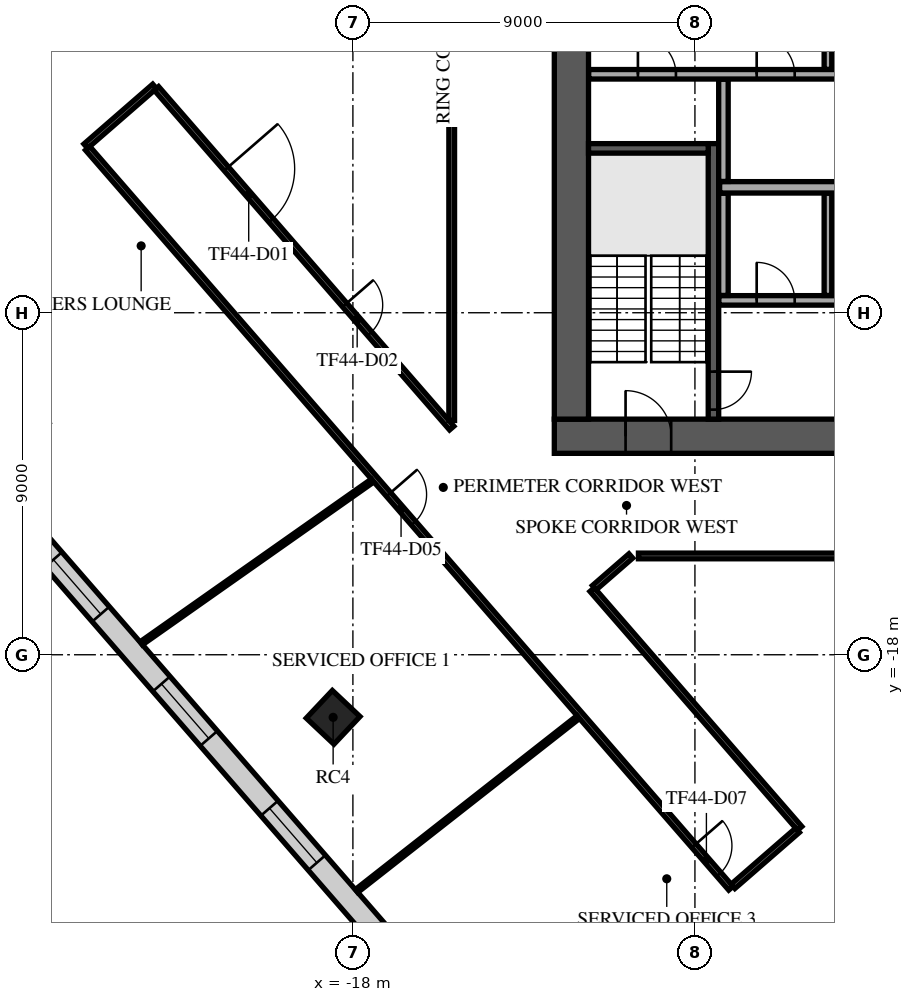
"""IFC4 building model, lengths in metres.
Left out: names, types, materials, properties, quantities, classifications, styles, units other than length and angle.
Written with IfcOpenShell. Run it as: python <this file> out.ifc"""

import sys

from ifc_helpers import new_model, si_unit, direction, frame, frame_2d, origin, origin_2d, place, context, subcontext, project, spatial, rectangle, extrude, element, fill, save


model = new_model("IFC4")
c1 = context("Model", 3, precision=1e-05, world=origin(), true_north=direction((0.0, 1.0)))
c2 = subcontext(c1, "Body", "Model", "MODEL_VIEW")
j1 = project(units=[si_unit("LENGTHUNIT", "METRE"), si_unit("PLANEANGLEUNIT", "RADIAN")], contexts=[c1])
p1 = place(None, origin())
s1 = spatial("IfcSite", under=j1, at=p1, CompositionType="ELEMENT")
p2 = place(p1, origin())
s2 = spatial("IfcBuilding", under=s1, at=p2, CompositionType="ELEMENT")
p3 = place(p2, frame((0.0, 0.0, 193.3)))
s3 = spatial("IfcBuildingStorey", under=s2, at=p3, CompositionType="ELEMENT", Elevation=193.3)
p4 = place(p3, frame((-18.52, -19.647, 0.0), z_axis=(0.0, 0.0, 1.0), x_axis=(0.685916152371, 0.727680583715, 0.0)))
e1 = element("IfcColumn", 1, at=p4, inside=s3, PredefinedType="COLUMN", context=c2, shape_type="SweptSolid", body=[
    extrude(rectangle(XDim=1.0, YDim=1.0, at=origin_2d()), origin(), (0.0, 0.0, 1.0), 4.0),
])
p5 = place(p3, frame((-12.7, -12.25, 0.0), z_axis=(0.0, 0.0, 1.0), x_axis=(1.0, 0.0, 0.0)))
e2 = element("IfcWall", 2, at=p5, inside=s3, PredefinedType="SHEAR", context=c2, shape_type="SweptSolid", body=[
    extrude(rectangle(XDim=25.4, YDim=0.9, at=frame_2d((12.7, 0.0))), origin(), (0.0, 0.0, 1.0), 3.62),
])
p6 = place(p5, frame((7.6, 0.0, 0.0)))
e3 = element("IfcOpeningElement", 3, at=p6, cuts=e2, PredefinedType="OPENING", context=c2, shape_type="SweptSolid", body=[
    extrude(rectangle(XDim=2.0, YDim=2.1, at=frame_2d((1.0, 1.05))), frame((0.0, 0.46, 0.0), z_axis=(0.0, -1.0, 0.0), x_axis=(1.0, 0.0, 0.0)), (0.0, 0.0, 1.0), 0.92),
])
p7 = place(p5, frame((17.725, 0.0, 0.0)))
e4 = element("IfcOpeningElement", 4, at=p7, cuts=e2, PredefinedType="OPENING", context=c2, shape_type="SweptSolid", body=[
    extrude(rectangle(XDim=1.2, YDim=2.1, at=frame_2d((0.6, 1.05))), frame((0.0, 0.46, 0.0), z_axis=(0.0, -1.0, 0.0), x_axis=(1.0, 0.0, 0.0)), (0.0, 0.0, 1.0), 0.92),
])
p8 = place(p5, frame((1.875, 0.0, 0.0)))
e5 = element("IfcOpeningElement", 5, at=p8, cuts=e2, PredefinedType="OPENING", context=c2, shape_type="SweptSolid", body=[
    extrude(rectangle(XDim=1.2, YDim=2.1, at=frame_2d((0.6, 1.05))), frame((0.0, 0.46, 0.0), z_axis=(0.0, -1.0, 0.0), x_axis=(1.0, 0.0, 0.0)), (0.0, 0.0, 1.0), 0.92),
])
p9 = place(p5, frame((22.325, 0.0, 0.0)))
e6 = element("IfcOpeningElement", 6, at=p9, cuts=e2, PredefinedType="OPENING", context=c2, shape_type="SweptSolid", body=[
    extrude(rectangle(XDim=1.2, YDim=2.1, at=frame_2d((0.6, 1.05))), frame((0.0, 0.46, 0.0), z_axis=(0.0, -1.0, 0.0), x_axis=(1.0, 0.0, 0.0)), (0.0, 0.0, 1.0), 0.92),
])
p10 = place(p3, frame((-12.25, -11.8, 0.0), z_axis=(0.0, 0.0, 1.0), x_axis=(0.0, 1.0, 0.0)))
e7 = element("IfcWall", 7, at=p10, inside=s3, PredefinedType="SHEAR", context=c2, shape_type="SweptSolid", body=[
    extrude(rectangle(XDim=23.6, YDim=0.9, at=frame_2d((11.8, 0.0))), origin(), (0.0, 0.0, 1.0), 3.62),
])
p11 = place(p10, frame((10.6, 0.0, 0.0)))
e8 = element("IfcOpeningElement", 8, at=p11, cuts=e7, PredefinedType="OPENING", context=c2, shape_type="SweptSolid", body=[
    extrude(rectangle(XDim=2.4, YDim=2.4, at=frame_2d((1.2, 1.2))), frame((0.0, 0.46, 0.0), z_axis=(0.0, -1.0, 0.0), x_axis=(1.0, 0.0, 0.0)), (0.0, 0.0, 1.0), 0.92),
])
p12 = place(p3, frame((-8.512, -4.55, 0.0), z_axis=(0.0, 0.0, 1.0), x_axis=(0.0, -1.0, 0.0)))
e9 = element("IfcWall", 9, at=p12, inside=s3, PredefinedType="SOLIDWALL", context=c2, shape_type="SweptSolid", body=[
    extrude(rectangle(XDim=7.25, YDim=0.275, at=frame_2d((3.625, 0.0))), origin(), (0.0, 0.0, 1.0), 3.62),
])
p13 = place(p12, frame((6.0, 0.0, 0.0)))
e10 = element("IfcOpeningElement", 10, at=p13, cuts=e9, PredefinedType="OPENING", context=c2, shape_type="SweptSolid", body=[
    extrude(rectangle(XDim=1.0, YDim=2.1, at=frame_2d((0.5, 1.05))), frame((0.0, 0.147, 0.0), z_axis=(0.0, -1.0, 0.0), x_axis=(1.0, 0.0, 0.0)), (0.0, 0.0, 1.0), 0.295),
])
p14 = place(p3, frame((-8.65, -4.675, 0.0), z_axis=(0.0, 0.0, 1.0), x_axis=(-1.0, 0.0, 0.0)))
e11 = element("IfcWall", 11, at=p14, inside=s3, PredefinedType="SOLIDWALL", context=c2, shape_type="SweptSolid", body=[
    extrude(rectangle(XDim=3.15, YDim=0.25, at=frame_2d((1.575, 0.0))), origin(), (0.0, 0.0, 1.0), 3.62),
])
p15 = place(p3, frame((-8.37, -8.675, 0.0), z_axis=(0.0, 0.0, 1.0), x_axis=(1.0, 0.0, 0.0)))
e12 = element("IfcWall", 12, at=p15, inside=s3, PredefinedType="PARTITIONING", context=c2, shape_type="SweptSolid", body=[
    extrude(rectangle(XDim=5.49, YDim=0.25, at=frame_2d((2.745, 0.0))), origin(), (0.0, 0.0, 1.0), 3.62),
])
p16 = place(p15, frame((0.995, 0.0, 0.0)))
e13 = element("IfcOpeningElement", 13, at=p16, cuts=e12, PredefinedType="OPENING", context=c2, shape_type="SweptSolid", body=[
    extrude(rectangle(XDim=1.0, YDim=2.1, at=frame_2d((0.5, 1.05))), frame((0.0, 0.135, 0.0), z_axis=(0.0, -1.0, 0.0), x_axis=(1.0, 0.0, 0.0)), (0.0, 0.0, 1.0), 0.27),
])
p17 = place(p15, frame((3.745, 0.0, 0.0)))
e14 = element("IfcOpeningElement", 14, at=p17, cuts=e12, PredefinedType="OPENING", context=c2, shape_type="SweptSolid", body=[
    extrude(rectangle(XDim=1.0, YDim=2.1, at=frame_2d((0.5, 1.05))), frame((0.0, 0.135, 0.0), z_axis=(0.0, -1.0, 0.0), x_axis=(1.0, 0.0, 0.0)), (0.0, 0.0, 1.0), 0.27),
])
p18 = place(p3, frame((-8.25, -8.545, 0.0), z_axis=(0.0, 0.0, 1.0), x_axis=(0.0, 1.0, 0.0)))
e15 = element("IfcWall", 15, at=p18, inside=s3, PredefinedType="PARTITIONING", context=c2, shape_type="SweptSolid", body=[
    extrude(rectangle(XDim=2.69, YDim=0.25, at=frame_2d((1.345, 0.0))), origin(), (0.0, 0.0, 1.0), 3.62),
])
p19 = place(p3, frame((-5.5, -8.545, 0.0), z_axis=(0.0, 0.0, 1.0), x_axis=(0.0, 1.0, 0.0)))
e16 = element("IfcWall", 16, at=p19, inside=s3, PredefinedType="PARTITIONING", context=c2, shape_type="SweptSolid", body=[
    extrude(rectangle(XDim=2.69, YDim=0.2, at=frame_2d((1.345, 0.0))), origin(), (0.0, 0.0, 1.0), 3.62),
])
p20 = place(p3, frame((-8.35, -5.7, 0.0), z_axis=(0.0, 0.0, 1.0), x_axis=(1.0, 0.0, 0.0)))
e17 = element("IfcWall", 17, at=p20, inside=s3, PredefinedType="PARTITIONING", context=c2, shape_type="SweptSolid", body=[
    extrude(rectangle(XDim=5.47, YDim=0.3, at=frame_2d((2.735, 0.0))), origin(), (0.0, 0.0, 1.0), 3.62),
])
p21 = place(p3, frame((-8.25, -5.545, 0.0), z_axis=(0.0, 0.0, 1.0), x_axis=(0.0, 1.0, 0.0)))
e18 = element("IfcWall", 18, at=p21, inside=s3, PredefinedType="PARTITIONING", context=c2, shape_type="SweptSolid", body=[
    extrude(rectangle(XDim=2.69, YDim=0.25, at=frame_2d((1.345, 0.0))), origin(), (0.0, 0.0, 1.0), 3.62),
])
p22 = place(p3, frame((-11.795, -2.725, 0.0), z_axis=(0.0, 0.0, 1.0), x_axis=(1.0, 0.0, 0.0)))
e19 = element("IfcWall", 19, at=p22, inside=s3, PredefinedType="PARTITIONING", context=c2, shape_type="SweptSolid", body=[
    extrude(rectangle(XDim=8.915, YDim=0.25, at=frame_2d((4.458, 0.0))), origin(), (0.0, 0.0, 1.0), 3.62),
])
p23 = place(p22, frame((1.295, 0.0, 0.0)))
e20 = element("IfcOpeningElement", 20, at=p23, cuts=e19, PredefinedType="OPENING", context=c2, shape_type="SweptSolid", body=[
    extrude(rectangle(XDim=1.0, YDim=2.1, at=frame_2d((0.5, 1.05))), frame((0.0, 0.135, 0.0), z_axis=(0.0, -1.0, 0.0), x_axis=(1.0, 0.0, 0.0)), (0.0, 0.0, 1.0), 0.27),
])
p24 = place(p22, frame((4.42, 0.0, 0.0)))
e21 = element("IfcOpeningElement", 21, at=p24, cuts=e19, PredefinedType="OPENING", context=c2, shape_type="SweptSolid", body=[
    extrude(rectangle(XDim=1.0, YDim=2.1, at=frame_2d((0.5, 1.05))), frame((0.0, 0.135, 0.0), z_axis=(0.0, -1.0, 0.0), x_axis=(1.0, 0.0, 0.0)), (0.0, 0.0, 1.0), 0.27),
])
p25 = place(p3, frame((-5.5, -2.595, 0.0), z_axis=(0.0, 0.0, 1.0), x_axis=(0.0, 1.0, 0.0)))
e22 = element("IfcWall", 22, at=p25, inside=s3, PredefinedType="PARTITIONING", context=c2, shape_type="SweptSolid", body=[
    extrude(rectangle(XDim=5.19, YDim=0.2, at=frame_2d((2.595, 0.0))), origin(), (0.0, 0.0, 1.0), 3.62),
])
p26 = place(p25, frame((1.395, 0.0, 0.0)))
e23 = element("IfcOpeningElement", 23, at=p26, cuts=e22, PredefinedType="OPENING", context=c2, shape_type="SweptSolid", body=[
    extrude(rectangle(XDim=2.4, YDim=2.4, at=frame_2d((1.2, 1.2))), frame((0.0, 0.11, 0.0), z_axis=(0.0, -1.0, 0.0), x_axis=(1.0, 0.0, 0.0)), (0.0, 0.0, 1.0), 0.22),
])
p27 = place(p3, frame((-35.208, -4.768, 0.0), z_axis=(0.0, 0.0, 1.0), x_axis=(0.656058749455, -0.754709823219, 0.0)))
e24 = element("IfcWall", 24, at=p27, inside=s3, PredefinedType="STANDARD", context=c2, shape_type="SweptSolid", body=[
    extrude(rectangle(XDim=39.0, YDim=0.6, at=frame_2d((19.5, 0.0))), origin(), (0.0, 0.0, 1.0), 3.62),
])
p28 = place(p27, frame((1.217, 0.0, 0.9)))
e25 = element("IfcOpeningElement", 25, at=p28, cuts=e24, PredefinedType="OPENING", context=c2, shape_type="SweptSolid", body=[
    extrude(rectangle(XDim=1.9, YDim=2.1, at=frame_2d((0.95, 1.05))), frame((0.0, 0.31, 0.0), z_axis=(0.0, -1.0, 0.0), x_axis=(1.0, 0.0, 0.0)), (0.0, 0.0, 1.0), 0.62),
])
p29 = place(p27, frame((5.55, 0.0, 0.9)))
e26 = element("IfcOpeningElement", 26, at=p29, cuts=e24, PredefinedType="OPENING", context=c2, shape_type="SweptSolid", body=[
    extrude(rectangle(XDim=1.9, YDim=2.1, at=frame_2d((0.95, 1.05))), frame((0.0, 0.31, 0.0), z_axis=(0.0, -1.0, 0.0), x_axis=(1.0, 0.0, 0.0)), (0.0, 0.0, 1.0), 0.62),
])
p30 = place(p27, frame((9.883, 0.0, 0.9)))
e27 = element("IfcOpeningElement", 27, at=p30, cuts=e24, PredefinedType="OPENING", context=c2, shape_type="SweptSolid", body=[
    extrude(rectangle(XDim=1.9, YDim=2.1, at=frame_2d((0.95, 1.05))), frame((0.0, 0.31, 0.0), z_axis=(0.0, -1.0, 0.0), x_axis=(1.0, 0.0, 0.0)), (0.0, 0.0, 1.0), 0.62),
])
p31 = place(p27, frame((14.217, 0.0, 0.9)))
e28 = element("IfcOpeningElement", 28, at=p31, cuts=e24, PredefinedType="OPENING", context=c2, shape_type="SweptSolid", body=[
    extrude(rectangle(XDim=1.9, YDim=2.1, at=frame_2d((0.95, 1.05))), frame((0.0, 0.31, 0.0), z_axis=(0.0, -1.0, 0.0), x_axis=(1.0, 0.0, 0.0)), (0.0, 0.0, 1.0), 0.62),
])
p32 = place(p27, frame((18.55, 0.0, 0.9)))
e29 = element("IfcOpeningElement", 29, at=p32, cuts=e24, PredefinedType="OPENING", context=c2, shape_type="SweptSolid", body=[
    extrude(rectangle(XDim=1.9, YDim=2.1, at=frame_2d((0.95, 1.05))), frame((0.0, 0.31, 0.0), z_axis=(0.0, -1.0, 0.0), x_axis=(1.0, 0.0, 0.0)), (0.0, 0.0, 1.0), 0.62),
])
p33 = place(p27, frame((22.883, 0.0, 0.9)))
e30 = element("IfcOpeningElement", 30, at=p33, cuts=e24, PredefinedType="OPENING", context=c2, shape_type="SweptSolid", body=[
    extrude(rectangle(XDim=1.9, YDim=2.1, at=frame_2d((0.95, 1.05))), frame((0.0, 0.31, 0.0), z_axis=(0.0, -1.0, 0.0), x_axis=(1.0, 0.0, 0.0)), (0.0, 0.0, 1.0), 0.62),
])
p34 = place(p27, frame((27.217, 0.0, 0.9)))
e31 = element("IfcOpeningElement", 31, at=p34, cuts=e24, PredefinedType="OPENING", context=c2, shape_type="SweptSolid", body=[
    extrude(rectangle(XDim=1.9, YDim=2.1, at=frame_2d((0.95, 1.05))), frame((0.0, 0.31, 0.0), z_axis=(0.0, -1.0, 0.0), x_axis=(1.0, 0.0, 0.0)), (0.0, 0.0, 1.0), 0.62),
])
p35 = place(p27, frame((31.55, 0.0, 0.9)))
e32 = element("IfcOpeningElement", 32, at=p35, cuts=e24, PredefinedType="OPENING", context=c2, shape_type="SweptSolid", body=[
    extrude(rectangle(XDim=1.9, YDim=2.1, at=frame_2d((0.95, 1.05))), frame((0.0, 0.31, 0.0), z_axis=(0.0, -1.0, 0.0), x_axis=(1.0, 0.0, 0.0)), (0.0, 0.0, 1.0), 0.62),
])
p36 = place(p27, frame((35.883, 0.0, 0.9)))
e33 = element("IfcOpeningElement", 33, at=p36, cuts=e24, PredefinedType="OPENING", context=c2, shape_type="SweptSolid", body=[
    extrude(rectangle(XDim=1.9, YDim=2.1, at=frame_2d((0.95, 1.05))), frame((0.0, 0.31, 0.0), z_axis=(0.0, -1.0, 0.0), x_axis=(1.0, 0.0, 0.0)), (0.0, 0.0, 1.0), 0.62),
])
p37 = place(p3, frame((-25.029, -4.616, 0.0), z_axis=(0.0, 0.0, 1.0), x_axis=(0.75457705231, 0.656211453822, 0.0)))
e34 = element("IfcWall", 34, at=p37, inside=s3, PredefinedType="PARTITIONING", context=c2, shape_type="SweptSolid", body=[
    extrude(rectangle(XDim=2.4, YDim=0.15, at=frame_2d((1.2, 0.0))), origin(), (0.0, 0.0, 1.0), 3.17),
])
p38 = place(p3, frame((-24.98, -4.673, 0.0), z_axis=(0.0, 0.0, 1.0), x_axis=(0.656048444225, -0.754718781289, 0.0)))
e35 = element("IfcWall", 35, at=p38, inside=s3, PredefinedType="PARTITIONING", context=c2, shape_type="SweptSolid", body=[
    extrude(rectangle(XDim=25.8, YDim=0.15, at=frame_2d((12.9, 0.0))), origin(), (0.0, 0.0, 1.0), 3.17),
])
p39 = place(p38, frame((12.071, 0.0, 0.0)))
e36 = element("IfcOpeningElement", 36, at=p39, cuts=e35, PredefinedType="OPENING", context=c2, shape_type="SweptSolid", body=[
    extrude(rectangle(XDim=1.0, YDim=2.1, at=frame_2d((0.5, 1.05))), frame((0.0, 0.085, 0.0), z_axis=(0.0, -1.0, 0.0), x_axis=(1.0, 0.0, 0.0)), (0.0, 0.0, 1.0), 0.17),
])
p40 = place(p38, frame((24.318, 0.0, 0.0)))
e37 = element("IfcOpeningElement", 37, at=p40, cuts=e35, PredefinedType="OPENING", context=c2, shape_type="SweptSolid", body=[
    extrude(rectangle(XDim=1.0, YDim=2.1, at=frame_2d((0.5, 1.05))), frame((0.0, 0.085, 0.0), z_axis=(0.0, -1.0, 0.0), x_axis=(1.0, 0.0, 0.0)), (0.0, 0.0, 1.0), 0.17),
])
p41 = place(p3, frame((-23.169, -3.098, 0.0), z_axis=(0.0, 0.0, 1.0), x_axis=(0.656047525283, -0.754719580089, 0.0)))
e38 = element("IfcWall", 38, at=p41, inside=s3, PredefinedType="PARTITIONING", context=c2, shape_type="SweptSolid", body=[
    extrude(rectangle(XDim=11.842, YDim=0.15, at=frame_2d((5.921, 0.0))), origin(), (0.0, 0.0, 1.0), 3.17),
])
p42 = place(p41, frame((2.8, 0.0, 0.0)))
e39 = element("IfcOpeningElement", 39, at=p42, cuts=e38, PredefinedType="OPENING", context=c2, shape_type="SweptSolid", body=[
    extrude(rectangle(XDim=1.8, YDim=2.1, at=frame_2d((0.9, 1.05))), frame((0.0, 0.085, 0.0), z_axis=(0.0, -1.0, 0.0), x_axis=(1.0, 0.0, 0.0)), (0.0, 0.0, 1.0), 0.17),
])
p43 = place(p41, frame((7.55, 0.0, 0.0)))
e40 = element("IfcOpeningElement", 40, at=p43, cuts=e38, PredefinedType="OPENING", context=c2, shape_type="SweptSolid", body=[
    extrude(rectangle(XDim=1.0, YDim=2.1, at=frame_2d((0.5, 1.05))), frame((0.0, 0.085, 0.0), z_axis=(0.0, -1.0, 0.0), x_axis=(1.0, 0.0, 0.0)), (0.0, 0.0, 1.0), 0.17),
])
p44 = place(p3, frame((-15.4, -11.834, 0.0), z_axis=(0.0, 0.0, 1.0), x_axis=(0.0, 1.0, 0.0)))
e41 = element("IfcWall", 41, at=p44, inside=s3, PredefinedType="PARTITIONING", context=c2, shape_type="SweptSolid", body=[
    extrude(rectangle(XDim=20.666, YDim=0.15, at=frame_2d((10.333, 0.0))), origin(), (0.0, 0.0, 1.0), 3.17),
])
p45 = place(p3, frame((-11.705, -16.285, 0.0), z_axis=(0.0, 0.0, 1.0), x_axis=(0.656018266208, -0.754745012837, 0.0)))
e42 = element("IfcWall", 42, at=p45, inside=s3, PredefinedType="PARTITIONING", context=c2, shape_type="SweptSolid", body=[
    extrude(rectangle(XDim=8.326, YDim=0.15, at=frame_2d((4.163, 0.0))), origin(), (0.0, 0.0, 1.0), 3.17),
])
p46 = place(p3, frame((-11.648, -16.236, 0.0), z_axis=(0.0, 0.0, 1.0), x_axis=(0.754638525281, 0.656140759412, 0.0)))
e43 = element("IfcWall", 43, at=p46, inside=s3, PredefinedType="PARTITIONING", context=c2, shape_type="SweptSolid", body=[
    extrude(rectangle(XDim=1.274, YDim=0.15, at=frame_2d((0.637, 0.0))), origin(), (0.0, 0.0, 1.0), 3.17),
])
p47 = place(p3, frame((-10.486, -15.4, 0.0), z_axis=(0.0, 0.0, 1.0), x_axis=(1.0, 0.0, 0.0)))
e44 = element("IfcWall", 44, at=p47, inside=s3, PredefinedType="PARTITIONING", context=c2, shape_type="SweptSolid", body=[
    extrude(rectangle(XDim=17.763, YDim=0.15, at=frame_2d((8.882, 0.0))), origin(), (0.0, 0.0, 1.0), 3.17),
])
p48 = place(p47, frame((14.154, 0.0, 0.0)))
e45 = element("IfcOpeningElement", 45, at=p48, cuts=e44, PredefinedType="OPENING", context=c2, shape_type="SweptSolid", body=[
    extrude(rectangle(XDim=1.0, YDim=2.1, at=frame_2d((0.5, 1.05))), frame((0.0, 0.085, 0.0), z_axis=(0.0, -1.0, 0.0), x_axis=(1.0, 0.0, 0.0)), (0.0, 0.0, 1.0), 0.17),
])
p49 = place(p3, frame((-7.997, -24.095, 0.0), z_axis=(0.0, 0.0, 1.0), x_axis=(0.754549456123, 0.656243185308, 0.0)))
e46 = element("IfcWall", 46, at=p49, inside=s3, PredefinedType="PARTITIONING", context=c2, shape_type="SweptSolid", body=[
    extrude(rectangle(XDim=2.25, YDim=0.15, at=frame_2d((1.125, 0.0))), origin(), (0.0, 0.0, 1.0), 3.17),
])
p50 = place(p3, frame((-23.568, -17.698, 0.0), z_axis=(0.0, 0.0, 1.0), x_axis=(0.817824726915, 0.575467389212, 0.0)))
e47 = element("IfcWall", 47, at=p50, inside=s3, PredefinedType="PARTITIONING", context=c2, shape_type="SweptSolid", body=[
    extrude(rectangle(XDim=7.438, YDim=0.1, at=frame_2d((3.719, 0.0))), origin(), (0.0, 0.0, 1.0), 3.17),
])
p51 = place(p3, frame((-17.903, -24.215, 0.0), z_axis=(0.0, 0.0, 1.0), x_axis=(0.786835853262, 0.617162328744, 0.0)))
e48 = element("IfcWall", 48, at=p51, inside=s3, PredefinedType="PARTITIONING", context=c2, shape_type="SweptSolid", body=[
    extrude(rectangle(XDim=7.412, YDim=0.1, at=frame_2d((3.706, 0.0))), origin(), (0.0, 0.0, 1.0), 3.17),
])
p52 = place(p3, frame((-5.674, -30.833, 0.0), z_axis=(0.0, 0.0, 1.0), x_axis=(0.114957483757, 0.993370412751, 0.0)))
e49 = element("IfcWall", 49, at=p52, inside=s3, PredefinedType="PARTITIONING", context=c2, shape_type="SweptSolid", body=[
    extrude(rectangle(XDim=15.455, YDim=0.1, at=frame_2d((7.727, 0.0))), origin(), (0.0, 0.0, 1.0), 3.62),
])
p53 = place(p8, origin())
e50 = element("IfcDoor", 50, at=p53, inside=s3, OperationType="SINGLE_SWING_LEFT", PredefinedType="DOOR", context=c2, shape_type="SweptSolid", body=[
    extrude(rectangle(XDim=1.2, YDim=2.1, at=frame_2d((0.6, 1.05))), frame((0.0, 0.025, 0.0), z_axis=(0.0, -1.0, 0.0), x_axis=(1.0, 0.0, 0.0)), (0.0, 0.0, 1.0), 0.05),
])
fill(e5, e50)
p54 = place(p13, origin())
e51 = element("IfcDoor", 51, at=p54, inside=s3, OperationType="SINGLE_SWING_LEFT", PredefinedType="DOOR", context=c2, shape_type="SweptSolid", body=[
    extrude(rectangle(XDim=1.0, YDim=2.1, at=frame_2d((0.5, 1.05))), frame((0.0, 0.025, 0.0), z_axis=(0.0, -1.0, 0.0), x_axis=(1.0, 0.0, 0.0)), (0.0, 0.0, 1.0), 0.05),
])
fill(e10, e51)
p55 = place(p16, origin())
e52 = element("IfcDoor", 52, at=p55, inside=s3, OperationType="SINGLE_SWING_RIGHT", PredefinedType="DOOR", context=c2, shape_type="SweptSolid", body=[
    extrude(rectangle(XDim=1.0, YDim=2.1, at=frame_2d((0.5, 1.05))), frame((0.0, 0.025, 0.0), z_axis=(0.0, -1.0, 0.0), x_axis=(1.0, 0.0, 0.0)), (0.0, 0.0, 1.0), 0.05),
])
fill(e13, e52)
p56 = place(p23, origin())
e53 = element("IfcDoor", 53, at=p56, inside=s3, OperationType="SINGLE_SWING_RIGHT", PredefinedType="DOOR", context=c2, shape_type="SweptSolid", body=[
    extrude(rectangle(XDim=1.0, YDim=2.1, at=frame_2d((0.5, 1.05))), frame((0.0, 0.025, 0.0), z_axis=(0.0, -1.0, 0.0), x_axis=(1.0, 0.0, 0.0)), (0.0, 0.0, 1.0), 0.05),
])
fill(e20, e53)
p57 = place(p24, origin())
e54 = element("IfcDoor", 54, at=p57, inside=s3, OperationType="SINGLE_SWING_RIGHT", PredefinedType="DOOR", context=c2, shape_type="SweptSolid", body=[
    extrude(rectangle(XDim=1.0, YDim=2.1, at=frame_2d((0.5, 1.05))), frame((0.0, 0.025, 0.0), z_axis=(0.0, -1.0, 0.0), x_axis=(1.0, 0.0, 0.0)), (0.0, 0.0, 1.0), 0.05),
])
fill(e21, e54)
p58 = place(p31, origin())
e55 = element("IfcWindow", 55, at=p58, inside=s3, PartitioningType="SINGLE_PANEL", PredefinedType="WINDOW", context=c2, shape_type="SweptSolid", body=[
    extrude(rectangle(XDim=1.9, YDim=2.1, at=frame_2d((0.95, 1.05))), frame((0.0, 0.03, 0.0), z_axis=(0.0, -1.0, 0.0), x_axis=(1.0, 0.0, 0.0)), (0.0, 0.0, 1.0), 0.06),
])
fill(e28, e55)
p59 = place(p32, origin())
e56 = element("IfcWindow", 56, at=p59, inside=s3, PartitioningType="SINGLE_PANEL", PredefinedType="WINDOW", context=c2, shape_type="SweptSolid", body=[
    extrude(rectangle(XDim=1.9, YDim=2.1, at=frame_2d((0.95, 1.05))), frame((0.0, 0.03, 0.0), z_axis=(0.0, -1.0, 0.0), x_axis=(1.0, 0.0, 0.0)), (0.0, 0.0, 1.0), 0.06),
])
fill(e29, e56)
p60 = place(p33, origin())
e57 = element("IfcWindow", 57, at=p60, inside=s3, PartitioningType="SINGLE_PANEL", PredefinedType="WINDOW", context=c2, shape_type="SweptSolid", body=[
    extrude(rectangle(XDim=1.9, YDim=2.1, at=frame_2d((0.95, 1.05))), frame((0.0, 0.03, 0.0), z_axis=(0.0, -1.0, 0.0), x_axis=(1.0, 0.0, 0.0)), (0.0, 0.0, 1.0), 0.06),
])
fill(e30, e57)
p61 = place(p42, origin())
e58 = element("IfcDoor", 58, at=p61, inside=s3, OperationType="DOUBLE_DOOR_SINGLE_SWING", PredefinedType="DOOR", context=c2, shape_type="SweptSolid", body=[
    extrude(rectangle(XDim=1.8, YDim=2.1, at=frame_2d((0.9, 1.05))), frame((0.0, 0.025, 0.0), z_axis=(0.0, -1.0, 0.0), x_axis=(1.0, 0.0, 0.0)), (0.0, 0.0, 1.0), 0.05),
])
fill(e39, e58)
p62 = place(p43, origin())
e59 = element("IfcDoor", 59, at=p62, inside=s3, OperationType="SINGLE_SWING_RIGHT", PredefinedType="DOOR", context=c2, shape_type="SweptSolid", body=[
    extrude(rectangle(XDim=1.0, YDim=2.1, at=frame_2d((0.5, 1.05))), frame((0.0, 0.025, 0.0), z_axis=(0.0, -1.0, 0.0), x_axis=(1.0, 0.0, 0.0)), (0.0, 0.0, 1.0), 0.05),
])
fill(e40, e59)
p63 = place(p39, frame((1.0, 0.0, 0.0), z_axis=(0.0, 0.0, 1.0), x_axis=(-1.0, 0.0, 0.0)))
e60 = element("IfcDoor", 60, at=p63, inside=s3, OperationType="SINGLE_SWING_LEFT", PredefinedType="DOOR", context=c2, shape_type="SweptSolid", body=[
    extrude(rectangle(XDim=1.0, YDim=2.1, at=frame_2d((0.5, 1.05))), frame((0.0, 0.025, 0.0), z_axis=(0.0, -1.0, 0.0), x_axis=(1.0, 0.0, 0.0)), (0.0, 0.0, 1.0), 0.05),
])
fill(e36, e60)
p64 = place(p40, frame((1.0, 0.0, 0.0), z_axis=(0.0, 0.0, 1.0), x_axis=(-1.0, 0.0, 0.0)))
e61 = element("IfcDoor", 61, at=p64, inside=s3, OperationType="SINGLE_SWING_LEFT", PredefinedType="DOOR", context=c2, shape_type="SweptSolid", body=[
    extrude(rectangle(XDim=1.0, YDim=2.1, at=frame_2d((0.5, 1.05))), frame((0.0, 0.025, 0.0), z_axis=(0.0, -1.0, 0.0), x_axis=(1.0, 0.0, 0.0)), (0.0, 0.0, 1.0), 0.05),
])
fill(e37, e61)
save(model, sys.argv[1])
